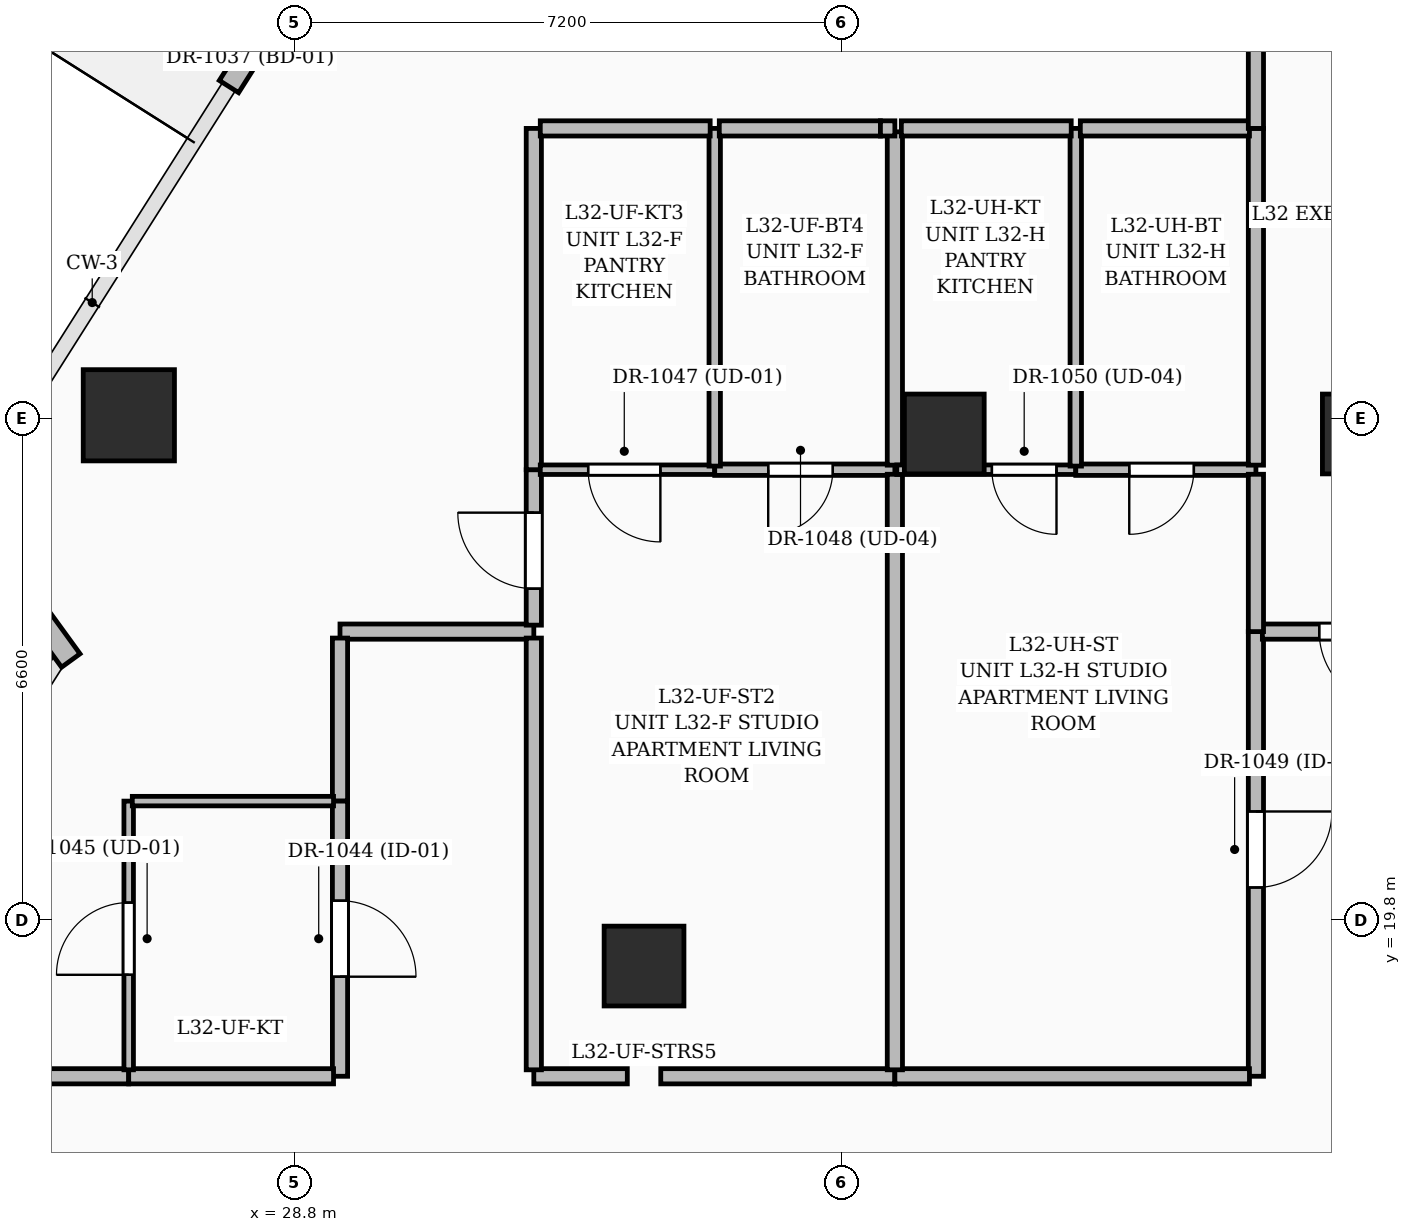
"""IFC4 building model, lengths in metres.
Left out: names, types, materials, properties, quantities, classifications, styles, units other than length and angle.
Written with IfcOpenShell. Run it as: python <this file> out.ifc"""

import sys

from ifc_helpers import new_model, si_unit, direction, frame, frame_2d, origin, origin_2d, place, context, subcontext, project, spatial, rectangle, extrude, element, fill, save


model = new_model("IFC4")
c1 = context("Model", 3, precision=1e-05, world=origin(), true_north=direction((0.0, 1.0)))
c2 = subcontext(c1, "Body", "Model", "MODEL_VIEW")
j1 = project(units=[si_unit("LENGTHUNIT", "METRE"), si_unit("PLANEANGLEUNIT", "RADIAN")], contexts=[c1])
p1 = place(None, origin())
s1 = spatial("IfcSite", under=j1, at=p1, CompositionType="ELEMENT")
p2 = place(p1, origin())
s2 = spatial("IfcBuilding", under=s1, at=p2, CompositionType="ELEMENT")
p3 = place(p2, frame((0.0, 0.0, 128.4)))
s3 = spatial("IfcBuildingStorey", under=s2, at=p3, CompositionType="ELEMENT", Elevation=128.4)
for number, where, z_axis, x_axis in (
    (1, (42.85, 26.2, 0.0), (0.0, 0.0, 1.0), (1.0, 0.0, 0.0)),
    (2, (37.35, 26.2, 0.0), (0.0, 0.0, 1.0), (1.0, 0.0, 0.0)),
    (3, (33.4, 19.2, 0.0), (0.0, 0.0, 1.0), (1.0, 0.0, 0.0)),
):
    element("IfcColumn", number, at=place(p3, frame(where, z_axis=z_axis, x_axis=x_axis)), inside=s3, PredefinedType="COLUMN", context=c2, shape_type="SweptSolid", body=[
        extrude(rectangle(XDim=1.05, YDim=1.05, at=origin_2d()), origin(), (0.0, 0.0, 1.0), 3.6),
    ])
p4 = place(p3, frame((26.622, 26.446, 0.0), z_axis=(0.0, 0.0, 1.0), x_axis=(1.0, 0.0, 0.0)))
e4 = element("IfcColumn", 4, at=p4, inside=s3, PredefinedType="COLUMN", context=c2, shape_type="SweptSolid", body=[
    extrude(rectangle(XDim=1.2, YDim=1.2, at=origin_2d()), origin(), (0.0, 0.0, 1.0), 3.6),
])
p5 = place(p3, frame((25.858, 23.22, 0.0), z_axis=(0.0, 0.0, 1.0), x_axis=(-0.587763102288, 0.809033086832, 0.0)))
e5 = element("IfcWall", 5, at=p5, inside=s3, PredefinedType="SOLIDWALL", context=c2, shape_type="SweptSolid", body=[
    extrude(rectangle(XDim=2.594, YDim=0.3, at=frame_2d((1.297, 0.0))), origin(), (0.0, 0.0, 1.0), 2.575),
])
p6 = place(p3, frame((27.939, 30.771, 0.0), z_axis=(0.0, 0.0, 1.0), x_axis=(0.534879578565, 0.84492830254, 0.0)))
e6 = element("IfcWall", 6, at=p6, inside=s3, PredefinedType="SOLIDWALL", context=c2, shape_type="SweptSolid", body=[
    extrude(rectangle(XDim=7.105, YDim=0.3, at=frame_2d((3.552, 0.0))), origin(), (0.0, 0.0, 1.0), 3.35),
])
p7 = place(p6, frame((1.277, 0.0, 0.0)))
e7 = element("IfcOpeningElement", 7, at=p7, cuts=e6, PredefinedType="OPENING", context=c2, shape_type="SweptSolid", body=[
    extrude(rectangle(XDim=1.0, YDim=2.2, at=frame_2d((0.5, 1.1))), frame((0.0, 0.16, 0.0), z_axis=(0.0, -1.0, 0.0), x_axis=(1.0, 0.0, 0.0)), (0.0, 0.0, 1.0), 0.32),
])
p8 = place(p3, frame((42.472, 36.42, 0.0), z_axis=(0.0, 0.0, 1.0), x_axis=(0.506315009763, -0.86234860172, 0.0)))
e8 = element("IfcWall", 8, at=p8, inside=s3, PredefinedType="SOLIDWALL", context=c2, shape_type="SweptSolid", body=[
    extrude(rectangle(XDim=6.553, YDim=0.3, at=frame_2d((3.277, 0.0))), origin(), (0.0, 0.0, 1.0), 3.35),
])
p9 = place(p8, frame((2.075, 0.0, 0.6)))
e9 = element("IfcOpeningElement", 9, at=p9, cuts=e8, PredefinedType="OPENING", context=c2, shape_type="SweptSolid", body=[
    extrude(rectangle(XDim=2.4, YDim=2.1, at=frame_2d((1.2, 1.05))), frame((0.0, 0.16, 0.0), z_axis=(0.0, -1.0, 0.0), x_axis=(1.0, 0.0, 0.0)), (0.0, 0.0, 1.0), 0.32),
])
for number, where, z_axis, x_axis in (
    (10, (26.62, 17.75, 0.0), (0.0, 0.0, 1.0), (-1.0, 0.0, 0.0)),
    (11, (31.95, 23.6, 0.0), (0.0, 0.0, 1.0), (-1.0, 0.0, 0.0)),
):
    element("IfcWall", number, at=place(p3, frame(where, z_axis=z_axis, x_axis=x_axis)), inside=s3, PredefinedType="PARTITIONING", context=c2, shape_type="SweptSolid", body=[
        extrude(rectangle(XDim=2.55, YDim=0.2, at=frame_2d((1.275, 0.0))), origin(), (0.0, 0.0, 1.0), 1.12),
    ])
p10 = place(p3, frame((29.4, 23.515, 0.0), z_axis=(0.0, 0.0, 1.0), x_axis=(0.0, -1.0, 0.0)))
e12 = element("IfcWall", 12, at=p10, inside=s3, PredefinedType="PARTITIONING", context=c2, shape_type="SweptSolid", body=[
    extrude(rectangle(XDim=2.145, YDim=0.2, at=frame_2d((1.072, 0.0))), origin(), (0.0, 0.0, 1.0), 1.12),
])
p11 = place(p3, frame((29.4, 21.37, 0.0), z_axis=(0.0, 0.0, 1.0), x_axis=(0.0, -1.0, 0.0)))
e13 = element("IfcWall", 13, at=p11, inside=s3, PredefinedType="PARTITIONING", context=c2, shape_type="SweptSolid", body=[
    extrude(rectangle(XDim=3.62, YDim=0.2, at=frame_2d((1.81, 0.0))), origin(), (0.0, 0.0, 1.0), 2.911),
])
p12 = place(p11, frame((1.31, 0.0, 0.0)))
e14 = element("IfcOpeningElement", 14, at=p12, cuts=e13, PredefinedType="OPENING", context=c2, shape_type="SweptSolid", body=[
    extrude(rectangle(XDim=1.0, YDim=2.2, at=frame_2d((0.5, 1.1))), frame((0.0, 0.11, 0.0), z_axis=(0.0, -1.0, 0.0), x_axis=(1.0, 0.0, 0.0)), (0.0, 0.0, 1.0), 0.22),
])
p13 = place(p3, frame((29.315, 17.75, 0.0), z_axis=(0.0, 0.0, 1.0), x_axis=(-1.0, 0.0, 0.0)))
e15 = element("IfcWall", 15, at=p13, inside=s3, PredefinedType="PARTITIONING", context=c2, shape_type="SweptSolid", body=[
    extrude(rectangle(XDim=2.695, YDim=0.2, at=frame_2d((1.347, 0.0))), origin(), (0.0, 0.0, 1.0), 2.911),
])
p14 = place(p3, frame((33.18, 17.75, 0.0), z_axis=(0.0, 0.0, 1.0), x_axis=(-1.0, 0.0, 0.0)))
e16 = element("IfcWall", 16, at=p14, inside=s3, PredefinedType="PARTITIONING", context=c2, shape_type="SweptSolid", body=[
    extrude(rectangle(XDim=1.23, YDim=0.2, at=frame_2d((0.615, 0.0))), origin(), (0.0, 0.0, 1.0), 3.35),
])
p15 = place(p3, frame((31.95, 17.835, 0.0), z_axis=(0.0, 0.0, 1.0), x_axis=(0.0, 1.0, 0.0)))
e17 = element("IfcWall", 17, at=p15, inside=s3, PredefinedType="PARTITIONING", context=c2, shape_type="SweptSolid", body=[
    extrude(rectangle(XDim=5.68, YDim=0.2, at=frame_2d((2.84, 0.0))), origin(), (0.0, 0.0, 1.0), 1.12),
])
p16 = place(p3, frame((36.7, 17.75, 0.0), z_axis=(0.0, 0.0, 1.0), x_axis=(-1.0, 0.0, 0.0)))
e18 = element("IfcWall", 18, at=p16, inside=s3, PredefinedType="PARTITIONING", context=c2, shape_type="SweptSolid", body=[
    extrude(rectangle(XDim=3.08, YDim=0.2, at=frame_2d((1.54, 0.0))), origin(), (0.0, 0.0, 1.0), 2.436),
])
p17 = place(p3, frame((41.45, 23.6, 0.0), z_axis=(0.0, 0.0, 1.0), x_axis=(0.0, -1.0, 0.0)))
e19 = element("IfcWall", 19, at=p17, inside=s3, PredefinedType="PARTITIONING", context=c2, shape_type="SweptSolid", body=[
    extrude(rectangle(XDim=5.85, YDim=0.2, at=frame_2d((2.925, 0.0))), origin(), (0.0, 0.0, 1.0), 3.35),
])
p18 = place(p17, frame((2.366, 0.0, 0.0)))
e20 = element("IfcOpeningElement", 20, at=p18, cuts=e19, PredefinedType="OPENING", context=c2, shape_type="SweptSolid", body=[
    extrude(rectangle(XDim=1.0, YDim=2.2, at=frame_2d((0.5, 1.1))), frame((0.0, 0.11, 0.0), z_axis=(0.0, -1.0, 0.0), x_axis=(1.0, 0.0, 0.0)), (0.0, 0.0, 1.0), 0.22),
])
p19 = place(p3, frame((41.365, 17.75, 0.0), z_axis=(0.0, 0.0, 1.0), x_axis=(-1.0, 0.0, 0.0)))
e21 = element("IfcWall", 21, at=p19, inside=s3, PredefinedType="PARTITIONING", context=c2, shape_type="SweptSolid", body=[
    extrude(rectangle(XDim=4.665, YDim=0.2, at=frame_2d((2.333, 0.0))), origin(), (0.0, 0.0, 1.0), 3.35),
])
p20 = place(p3, frame((43.915, 23.6, 0.0), z_axis=(0.0, 0.0, 1.0), x_axis=(-1.0, 0.0, 0.0)))
e22 = element("IfcWall", 22, at=p20, inside=s3, PredefinedType="PARTITIONING", context=c2, shape_type="SweptSolid", body=[
    extrude(rectangle(XDim=2.38, YDim=0.2, at=frame_2d((1.19, 0.0))), origin(), (0.0, 0.0, 1.0), 2.436),
])
p21 = place(p20, frame((0.632, 0.0, 0.0)))
e23 = element("IfcOpeningElement", 23, at=p21, cuts=e22, PredefinedType="OPENING", context=c2, shape_type="SweptSolid", body=[
    extrude(rectangle(XDim=1.0, YDim=2.2, at=frame_2d((0.5, 1.1))), frame((0.0, 0.11, 0.0), z_axis=(0.0, -1.0, 0.0), x_axis=(1.0, 0.0, 0.0)), (0.0, 0.0, 1.0), 0.22),
])
p22 = place(p3, frame((26.62, 17.835, 0.0), z_axis=(0.0, 0.0, 1.0), x_axis=(0.0, 1.0, 0.0)))
e24 = element("IfcWall", 24, at=p22, inside=s3, PredefinedType="PARTITIONING", context=c2, shape_type="SweptSolid", body=[
    extrude(rectangle(XDim=3.535, YDim=0.125, at=frame_2d((1.768, 0.0))), origin(), (0.0, 0.0, 1.0), 2.911),
])
p23 = place(p22, frame((1.25, 0.0, 0.0)))
e25 = element("IfcOpeningElement", 25, at=p23, cuts=e24, PredefinedType="OPENING", context=c2, shape_type="SweptSolid", body=[
    extrude(rectangle(XDim=0.95, YDim=2.2, at=frame_2d((0.475, 1.1))), frame((0.0, 0.072, 0.0), z_axis=(0.0, -1.0, 0.0), x_axis=(1.0, 0.0, 0.0)), (0.0, 0.0, 1.0), 0.145),
])
p24 = place(p3, frame((26.667, 21.37, 0.0), z_axis=(0.0, 0.0, 1.0), x_axis=(1.0, 0.0, 0.0)))
e26 = element("IfcWall", 26, at=p24, inside=s3, PredefinedType="PARTITIONING", context=c2, shape_type="SweptSolid", body=[
    extrude(rectangle(XDim=2.647, YDim=0.125, at=frame_2d((1.324, 0.0))), origin(), (0.0, 0.0, 1.0), 2.911),
])
p25 = place(p3, frame((31.95, 23.685, 0.0), z_axis=(0.0, 0.0, 1.0), x_axis=(0.0, 1.0, 0.0)))
e27 = element("IfcWall", 27, at=p25, inside=s3, PredefinedType="PARTITIONING", context=c2, shape_type="SweptSolid", body=[
    extrude(rectangle(XDim=2.045, YDim=0.2, at=frame_2d((1.022, 0.0))), origin(), (0.0, 0.0, 1.0), 2.911),
])
p26 = place(p25, frame((0.48, 0.0, 0.0)))
e28 = element("IfcOpeningElement", 28, at=p26, cuts=e27, PredefinedType="OPENING", context=c2, shape_type="SweptSolid", body=[
    extrude(rectangle(XDim=1.0, YDim=2.2, at=frame_2d((0.5, 1.1))), frame((0.0, 0.11, 0.0), z_axis=(0.0, -1.0, 0.0), x_axis=(1.0, 0.0, 0.0)), (0.0, 0.0, 1.0), 0.22),
])
p27 = place(p3, frame((31.95, 25.73, 0.0), z_axis=(0.0, 0.0, 1.0), x_axis=(0.0, 1.0, 0.0)))
e29 = element("IfcWall", 29, at=p27, inside=s3, PredefinedType="PARTITIONING", context=c2, shape_type="SweptSolid", body=[
    extrude(rectangle(XDim=4.49, YDim=0.2, at=frame_2d((2.245, 0.0))), origin(), (0.0, 0.0, 1.0), 2.911),
])
p28 = place(p3, frame((34.33, 25.73, 0.0), z_axis=(0.0, 0.0, 1.0), x_axis=(-1.0, 0.0, 0.0)))
e30 = element("IfcWall", 30, at=p28, inside=s3, PredefinedType="PARTITIONING", context=c2, shape_type="SweptSolid", body=[
    extrude(rectangle(XDim=2.295, YDim=0.125, at=frame_2d((1.147, 0.0))), origin(), (0.0, 0.0, 1.0), 2.911),
])
p29 = place(p28, frame((0.715, 0.0, 0.0)))
e31 = element("IfcOpeningElement", 31, at=p29, cuts=e30, PredefinedType="OPENING", context=c2, shape_type="SweptSolid", body=[
    extrude(rectangle(XDim=0.95, YDim=2.2, at=frame_2d((0.475, 1.1))), frame((0.0, 0.072, 0.0), z_axis=(0.0, -1.0, 0.0), x_axis=(1.0, 0.0, 0.0)), (0.0, 0.0, 1.0), 0.145),
])
p30 = place(p3, frame((36.7, 25.73, 0.0), z_axis=(0.0, 0.0, 1.0), x_axis=(-1.0, 0.0, 0.0)))
e32 = element("IfcWall", 32, at=p30, inside=s3, PredefinedType="PARTITIONING", context=c2, shape_type="SweptSolid", body=[
    extrude(rectangle(XDim=2.37, YDim=0.15, at=frame_2d((1.185, 0.0))), origin(), (0.0, 0.0, 1.0), 2.911),
])
p31 = place(p30, frame((0.816, 0.0, 0.0)))
e33 = element("IfcOpeningElement", 33, at=p31, cuts=e32, PredefinedType="OPENING", context=c2, shape_type="SweptSolid", body=[
    extrude(rectangle(XDim=0.85, YDim=2.1, at=frame_2d((0.425, 1.05))), frame((0.0, 0.085, 0.0), z_axis=(0.0, -1.0, 0.0), x_axis=(1.0, 0.0, 0.0)), (0.0, 0.0, 1.0), 0.17),
])
p32 = place(p3, frame((36.7, 17.835, 0.0), z_axis=(0.0, 0.0, 1.0), x_axis=(0.0, 1.0, 0.0)))
e34 = element("IfcWall", 34, at=p32, inside=s3, PredefinedType="PARTITIONING", context=c2, shape_type="SweptSolid", body=[
    extrude(rectangle(XDim=7.835, YDim=0.2, at=frame_2d((3.917, 0.0))), origin(), (0.0, 0.0, 1.0), 2.436),
])
p33 = place(p3, frame((34.33, 25.778, 0.0), z_axis=(0.0, 0.0, 1.0), x_axis=(0.0, 1.0, 0.0)))
e35 = element("IfcWall", 35, at=p33, inside=s3, PredefinedType="PARTITIONING", context=c2, shape_type="SweptSolid", body=[
    extrude(rectangle(XDim=4.442, YDim=0.15, at=frame_2d((2.221, 0.0))), origin(), (0.0, 0.0, 1.0), 1.12),
])
p34 = place(p3, frame((34.27, 30.22, 0.0), z_axis=(0.0, 0.0, 1.0), x_axis=(-1.0, 0.0, 0.0)))
e36 = element("IfcWall", 36, at=p34, inside=s3, PredefinedType="PARTITIONING", context=c2, shape_type="SweptSolid", body=[
    extrude(rectangle(XDim=2.235, YDim=0.2, at=frame_2d((1.118, 0.0))), origin(), (0.0, 0.0, 1.0), 1.12),
])
p35 = place(p3, frame((36.7, 25.79, 0.0), z_axis=(0.0, 0.0, 1.0), x_axis=(0.0, 1.0, 0.0)))
e37 = element("IfcWall", 37, at=p35, inside=s3, PredefinedType="PARTITIONING", context=c2, shape_type="SweptSolid", body=[
    extrude(rectangle(XDim=4.385, YDim=0.2, at=frame_2d((2.192, 0.0))), origin(), (0.0, 0.0, 1.0), 1.12),
])
p36 = place(p3, frame((36.51, 30.22, 0.0), z_axis=(0.0, 0.0, 1.0), x_axis=(-1.0, 0.0, 0.0)))
e38 = element("IfcWall", 38, at=p36, inside=s3, PredefinedType="PARTITIONING", context=c2, shape_type="SweptSolid", body=[
    extrude(rectangle(XDim=2.12, YDim=0.2, at=frame_2d((1.06, 0.0))), origin(), (0.0, 0.0, 1.0), 1.12),
])
p37 = place(p3, frame((36.7, 30.22, 0.0), z_axis=(0.0, 0.0, 1.0), x_axis=(-1.0, 0.0, 0.0)))
e39 = element("IfcWall", 39, at=p37, inside=s3, PredefinedType="PARTITIONING", context=c2, shape_type="SweptSolid", body=[
    extrude(rectangle(XDim=0.19, YDim=0.2, at=frame_2d((0.095, 0.0))), origin(), (0.0, 0.0, 1.0), 3.35),
])
p38 = place(p3, frame((39.08, 25.73, 0.0), z_axis=(0.0, 0.0, 1.0), x_axis=(-1.0, 0.0, 0.0)))
e40 = element("IfcWall", 40, at=p38, inside=s3, PredefinedType="PARTITIONING", context=c2, shape_type="SweptSolid", body=[
    extrude(rectangle(XDim=2.355, YDim=0.125, at=frame_2d((1.177, 0.0))), origin(), (0.0, 0.0, 1.0), 2.436),
])
p39 = place(p38, frame((0.254, 0.0, 0.0)))
e41 = element("IfcOpeningElement", 41, at=p39, cuts=e40, PredefinedType="OPENING", context=c2, shape_type="SweptSolid", body=[
    extrude(rectangle(XDim=0.85, YDim=2.1, at=frame_2d((0.425, 1.05))), frame((0.0, 0.072, 0.0), z_axis=(0.0, -1.0, 0.0), x_axis=(1.0, 0.0, 0.0)), (0.0, 0.0, 1.0), 0.145),
])
p40 = place(p3, frame((41.45, 25.73, 0.0), z_axis=(0.0, 0.0, 1.0), x_axis=(-1.0, 0.0, 0.0)))
e42 = element("IfcWall", 42, at=p40, inside=s3, PredefinedType="PARTITIONING", context=c2, shape_type="SweptSolid", body=[
    extrude(rectangle(XDim=2.37, YDim=0.15, at=frame_2d((1.185, 0.0))), origin(), (0.0, 0.0, 1.0), 3.35),
])
p41 = place(p40, frame((0.816, 0.0, 0.0)))
e43 = element("IfcOpeningElement", 43, at=p41, cuts=e42, PredefinedType="OPENING", context=c2, shape_type="SweptSolid", body=[
    extrude(rectangle(XDim=0.85, YDim=2.1, at=frame_2d((0.425, 1.05))), frame((0.0, 0.085, 0.0), z_axis=(0.0, -1.0, 0.0), x_axis=(1.0, 0.0, 0.0)), (0.0, 0.0, 1.0), 0.17),
])
p42 = place(p3, frame((41.45, 23.6, 0.0), z_axis=(0.0, 0.0, 1.0), x_axis=(0.0, 1.0, 0.0)))
e44 = element("IfcWall", 44, at=p42, inside=s3, PredefinedType="PARTITIONING", context=c2, shape_type="SweptSolid", body=[
    extrude(rectangle(XDim=2.07, YDim=0.2, at=frame_2d((1.035, 0.0))), origin(), (0.0, 0.0, 1.0), 3.35),
])
p43 = place(p3, frame((39.08, 25.778, 0.0), z_axis=(0.0, 0.0, 1.0), x_axis=(0.0, 1.0, 0.0)))
e45 = element("IfcWall", 45, at=p43, inside=s3, PredefinedType="PARTITIONING", context=c2, shape_type="SweptSolid", body=[
    extrude(rectangle(XDim=4.442, YDim=0.15, at=frame_2d((2.221, 0.0))), origin(), (0.0, 0.0, 1.0), 2.37),
])
p44 = place(p3, frame((39.02, 30.22, 0.0), z_axis=(0.0, 0.0, 1.0), x_axis=(-1.0, 0.0, 0.0)))
e46 = element("IfcWall", 46, at=p44, inside=s3, PredefinedType="PARTITIONING", context=c2, shape_type="SweptSolid", body=[
    extrude(rectangle(XDim=2.235, YDim=0.2, at=frame_2d((1.118, 0.0))), origin(), (0.0, 0.0, 1.0), 3.35),
])
p45 = place(p3, frame((41.45, 25.79, 0.0), z_axis=(0.0, 0.0, 1.0), x_axis=(0.0, 1.0, 0.0)))
e47 = element("IfcWall", 47, at=p45, inside=s3, PredefinedType="PARTITIONING", context=c2, shape_type="SweptSolid", body=[
    extrude(rectangle(XDim=4.43, YDim=0.2, at=frame_2d((2.215, 0.0))), origin(), (0.0, 0.0, 1.0), 2.37),
])
p46 = place(p3, frame((41.365, 30.22, 0.0), z_axis=(0.0, 0.0, 1.0), x_axis=(-1.0, 0.0, 0.0)))
e48 = element("IfcWall", 48, at=p46, inside=s3, PredefinedType="PARTITIONING", context=c2, shape_type="SweptSolid", body=[
    extrude(rectangle(XDim=2.225, YDim=0.2, at=frame_2d((1.113, 0.0))), origin(), (0.0, 0.0, 1.0), 3.35),
])
p47 = place(p3, frame((41.45, 32.42, 0.0), z_axis=(0.0, 0.0, 1.0), x_axis=(0.0, -1.0, 0.0)))
e49 = element("IfcWall", 49, at=p47, inside=s3, PredefinedType="PARTITIONING", context=c2, shape_type="SweptSolid", body=[
    extrude(rectangle(XDim=2.2, YDim=0.2, at=frame_2d((1.1, 0.0))), origin(), (0.0, 0.0, 1.0), 1.12),
])
p48 = place(p12, origin())
e50 = element("IfcDoor", 50, at=p48, inside=s3, OperationType="SINGLE_SWING_RIGHT", PredefinedType="DOOR", context=c2, shape_type="SweptSolid", body=[
    extrude(rectangle(XDim=1.0, YDim=2.2, at=frame_2d((0.5, 1.1))), frame((0.0, 0.025, 0.0), z_axis=(0.0, -1.0, 0.0), x_axis=(1.0, 0.0, 0.0)), (0.0, 0.0, 1.0), 0.05),
])
fill(e14, e50)
p49 = place(p23, origin())
e51 = element("IfcDoor", 51, at=p49, inside=s3, OperationType="SINGLE_SWING_LEFT", PredefinedType="DOOR", context=c2, shape_type="SweptSolid", body=[
    extrude(rectangle(XDim=0.95, YDim=2.2, at=frame_2d((0.475, 1.1))), frame((0.0, 0.025, 0.0), z_axis=(0.0, -1.0, 0.0), x_axis=(1.0, 0.0, 0.0)), (0.0, 0.0, 1.0), 0.05),
])
fill(e25, e51)
p50 = place(p29, origin())
e52 = element("IfcDoor", 52, at=p50, inside=s3, OperationType="SINGLE_SWING_LEFT", PredefinedType="DOOR", context=c2, shape_type="SweptSolid", body=[
    extrude(rectangle(XDim=0.95, YDim=2.2, at=frame_2d((0.475, 1.1))), frame((0.0, 0.025, 0.0), z_axis=(0.0, -1.0, 0.0), x_axis=(1.0, 0.0, 0.0)), (0.0, 0.0, 1.0), 0.05),
])
fill(e31, e52)
p51 = place(p31, origin())
e53 = element("IfcDoor", 53, at=p51, inside=s3, OperationType="SINGLE_SWING_RIGHT", PredefinedType="DOOR", context=c2, shape_type="SweptSolid", body=[
    extrude(rectangle(XDim=0.85, YDim=2.1, at=frame_2d((0.425, 1.05))), frame((0.0, 0.025, 0.0), z_axis=(0.0, -1.0, 0.0), x_axis=(1.0, 0.0, 0.0)), (0.0, 0.0, 1.0), 0.05),
])
fill(e33, e53)
p52 = place(p18, origin())
e54 = element("IfcDoor", 54, at=p52, inside=s3, OperationType="SINGLE_SWING_LEFT", PredefinedType="DOOR", context=c2, shape_type="SweptSolid", body=[
    extrude(rectangle(XDim=1.0, YDim=2.2, at=frame_2d((0.5, 1.1))), frame((0.0, 0.025, 0.0), z_axis=(0.0, -1.0, 0.0), x_axis=(1.0, 0.0, 0.0)), (0.0, 0.0, 1.0), 0.05),
])
fill(e20, e54)
p53 = place(p39, origin())
e55 = element("IfcDoor", 55, at=p53, inside=s3, OperationType="SINGLE_SWING_LEFT", PredefinedType="DOOR", context=c2, shape_type="SweptSolid", body=[
    extrude(rectangle(XDim=0.85, YDim=2.1, at=frame_2d((0.425, 1.05))), frame((0.0, 0.025, 0.0), z_axis=(0.0, -1.0, 0.0), x_axis=(1.0, 0.0, 0.0)), (0.0, 0.0, 1.0), 0.05),
])
fill(e41, e55)
p54 = place(p41, origin())
e56 = element("IfcDoor", 56, at=p54, inside=s3, OperationType="SINGLE_SWING_RIGHT", PredefinedType="DOOR", context=c2, shape_type="SweptSolid", body=[
    extrude(rectangle(XDim=0.85, YDim=2.1, at=frame_2d((0.425, 1.05))), frame((0.0, 0.025, 0.0), z_axis=(0.0, -1.0, 0.0), x_axis=(1.0, 0.0, 0.0)), (0.0, 0.0, 1.0), 0.05),
])
fill(e43, e56)
p55 = place(p21, origin())
e57 = element("IfcDoor", 57, at=p55, inside=s3, OperationType="SINGLE_SWING_LEFT", PredefinedType="DOOR", context=c2, shape_type="SweptSolid", body=[
    extrude(rectangle(XDim=1.0, YDim=2.2, at=frame_2d((0.5, 1.1))), frame((0.0, 0.025, 0.0), z_axis=(0.0, -1.0, 0.0), x_axis=(1.0, 0.0, 0.0)), (0.0, 0.0, 1.0), 0.05),
])
fill(e23, e57)
p56 = place(p26, origin())
e58 = element("IfcDoor", 58, at=p56, inside=s3, OperationType="SINGLE_SWING_RIGHT", PredefinedType="DOOR", context=c2, shape_type="SweptSolid", body=[
    extrude(rectangle(XDim=1.0, YDim=2.2, at=frame_2d((0.5, 1.1))), frame((0.0, 0.025, 0.0), z_axis=(0.0, -1.0, 0.0), x_axis=(1.0, 0.0, 0.0)), (0.0, 0.0, 1.0), 0.05),
])
fill(e28, e58)
save(model, sys.argv[1])
